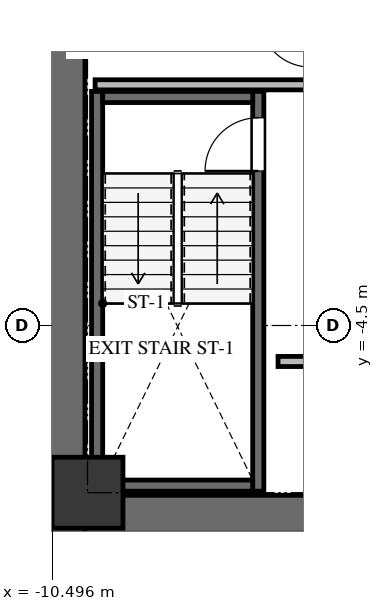
"""IFC4 building model, lengths in metres.
Left out: names, types, materials, properties, quantities, classifications, styles, units other than length and angle.
Written with IfcOpenShell. Run it as: python <this file> out.ifc"""

import sys

from ifc_helpers import new_model, si_unit, direction, frame, frame_2d, origin, origin_2d, place, context, subcontext, project, spatial, rectangle, extrude, source, transform, mapped, element, fill, save


model = new_model("IFC4")
c1 = context("Model", 3, precision=1e-05, world=origin(), true_north=direction((0.0, 1.0)))
c2 = subcontext(c1, "Body", "Model", "MODEL_VIEW")
j1 = project(units=[si_unit("LENGTHUNIT", "METRE"), si_unit("PLANEANGLEUNIT", "RADIAN")], contexts=[c1])
p1 = place(None, origin())
s1 = spatial("IfcSite", under=j1, at=p1, CompositionType="ELEMENT")
p2 = place(p1, origin())
s2 = spatial("IfcBuilding", under=s1, at=p2, CompositionType="ELEMENT")
p3 = place(p2, frame((0.0, 0.0, 130.5)))
s3 = spatial("IfcBuildingStorey", under=s2, at=p3, CompositionType="ELEMENT", Elevation=130.5)
p4 = place(p3, frame((-10.225, -8.6, 0.0), z_axis=(0.0, 0.0, 1.0), x_axis=(0.0, 1.0, 0.0)))
e1 = element("IfcWall", 1, at=p4, inside=s3, PredefinedType="SHEAR", context=c2, shape_type="SweptSolid", body=[
    extrude(rectangle(XDim=17.2, YDim=0.75, at=frame_2d((8.6, 0.0))), origin(), (0.0, 0.0, 1.0), 3.3),
])
p5 = place(p3, frame((-9.85, -8.225, 0.0), z_axis=(0.0, 0.0, 1.0), x_axis=(1.0, 0.0, 0.0)))
e2 = element("IfcWall", 2, at=p5, inside=s3, PredefinedType="SHEAR", context=c2, shape_type="SweptSolid", body=[
    extrude(rectangle(XDim=7.75, YDim=0.75, at=frame_2d((3.875, 0.0))), origin(), (0.0, 0.0, 1.0), 3.3),
])
p6 = place(p3, frame((-6.43, -7.77, -0.24), z_axis=(0.0, 0.0, 1.0), x_axis=(0.0, 1.0, 0.0)))
e3 = element("IfcWall", 3, at=p6, inside=s3, PredefinedType="SHEAR", context=c2, shape_type="SweptSolid", body=[
    extrude(rectangle(XDim=7.89, YDim=0.22, at=frame_2d((3.945, 0.0))), origin(), (0.0, 0.0, 1.0), 3.3),
])
p7 = place(p6, frame((6.32, 0.0, 0.0)))
e4 = element("IfcOpeningElement", 4, at=p7, cuts=e3, PredefinedType="OPENING", context=c2, shape_type="SweptSolid", body=[
    extrude(rectangle(XDim=1.05, YDim=2.15, at=frame_2d((0.525, 1.075))), frame((0.0, 0.12, 0.0), z_axis=(0.0, -1.0, 0.0), x_axis=(1.0, 0.0, 0.0)), (0.0, 0.0, 1.0), 0.24),
])
p8 = place(p3, frame((-9.61, 0.12, -0.24), z_axis=(0.0, 0.0, 1.0), x_axis=(0.0, -1.0, 0.0)))
e5 = element("IfcWall", 5, at=p8, inside=s3, PredefinedType="SHEAR", context=c2, shape_type="SweptSolid", body=[
    extrude(rectangle(XDim=7.89, YDim=0.22, at=frame_2d((3.945, 0.0))), origin(), (0.0, 0.0, 1.0), 3.3),
])
for number, where, z_axis, x_axis in (
    (6, (-9.5, -7.66, -0.24), (0.0, 0.0, 1.0), (1.0, 0.0, 0.0)),
    (7, (-6.54, 0.01, -0.24), (0.0, 0.0, 1.0), (-1.0, 0.0, 0.0)),
):
    element("IfcWall", number, at=place(p3, frame(where, z_axis=z_axis, x_axis=x_axis)), inside=s3, PredefinedType="SHEAR", context=c2, shape_type="SweptSolid", body=[
        extrude(rectangle(XDim=2.96, YDim=0.22, at=frame_2d((1.48, 0.0))), origin(), (0.0, 0.0, 1.0), 3.3),
    ])
m1 = source(origin(), c2, "Body", "SweptSolid", [
    extrude(rectangle(XDim=1.4, YDim=1.4, at=origin_2d()), origin(), (0.0, 0.0, 1.0), 3.3),
])
p9 = place(p3, frame((-9.8, -7.8, -0.24), z_axis=(0.0, 0.0, 1.0), x_axis=(1.0, 0.0, 0.0)))
e8 = element("IfcColumn", 8, at=p9, inside=s3, PredefinedType="COLUMN", context=c2, shape_type="MappedRepresentation", body=[
    mapped(m1, transform((0.0, 0.0, 0.0), x_axis=(1.0, 0.0, 0.0), y_axis=(0.0, 1.0, 0.0), z_axis=(0.0, 0.0, 1.0), scale=1.0)),
])
p10 = place(p3, frame((-9.65, 0.25, 0.0), z_axis=(0.0, 0.0, 1.0), x_axis=(1.0, 0.0, 0.0)))
e9 = element("IfcWall", 9, at=p10, inside=s3, PredefinedType="SOLIDWALL", context=c2, shape_type="SweptSolid", body=[
    extrude(rectangle(XDim=4.27, YDim=0.2, at=frame_2d((2.135, 0.0))), origin(), (0.0, 0.0, 1.0), 3.045),
])
p11 = place(p3, frame((-6.04, -5.21, 0.0), z_axis=(0.0, 0.0, 1.0), x_axis=(1.0, 0.0, 0.0)))
e10 = element("IfcWall", 10, at=p11, inside=s3, PredefinedType="SOLIDWALL", context=c2, shape_type="SweptSolid", body=[
    extrude(rectangle(XDim=3.53, YDim=0.2, at=frame_2d((1.765, 0.0))), origin(), (0.0, 0.0, 1.0), 3.045),
])
p12 = place(p11, frame((1.315, 0.0, 0.0)))
e11 = element("IfcOpeningElement", 11, at=p12, cuts=e10, PredefinedType="OPENING", context=c2, shape_type="SweptSolid", body=[
    extrude(rectangle(XDim=0.9, YDim=2.05, at=frame_2d((0.45, 1.025))), frame((0.0, 0.11, 0.0), z_axis=(0.0, -1.0, 0.0), x_axis=(1.0, 0.0, 0.0)), (0.0, 0.0, 1.0), 0.22),
])
m2 = source(origin(), c2, "Body", "SweptSolid", [
    extrude(rectangle(XDim=1.05, YDim=2.15, at=frame_2d((0.525, 1.075))), frame((0.0, 0.025, 0.0), z_axis=(0.0, -1.0, 0.0), x_axis=(1.0, 0.0, 0.0)), (0.0, 0.0, 1.0), 0.05),
])
p13 = place(p7, origin())
e12 = element("IfcDoor", 12, at=p13, inside=s3, OperationType="SINGLE_SWING_LEFT", PredefinedType="DOOR", context=c2, shape_type="MappedRepresentation", body=[
    mapped(m2, transform((0.0, 0.0, 0.0), x_axis=(1.0, 0.0, 0.0), y_axis=(0.0, 1.0, 0.0), z_axis=(0.0, 0.0, 1.0), scale=1.0)),
])
fill(e4, e12)
save(model, sys.argv[1])
